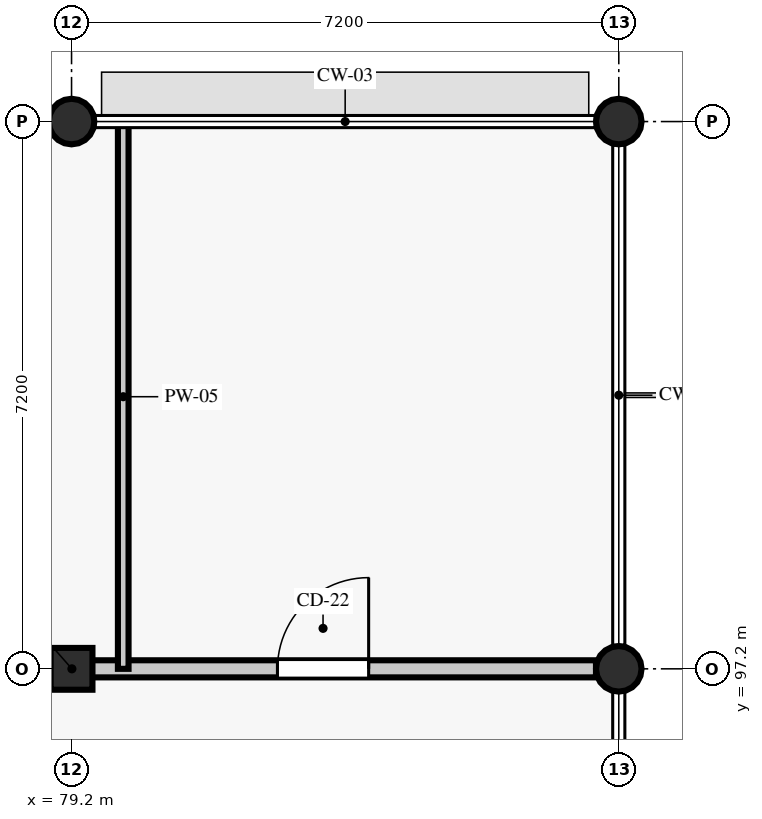
"""IFC4 building model, lengths in metres.
Left out: names, types, materials, properties, quantities, classifications, styles, units other than length and angle.
Written with IfcOpenShell. Run it as: python <this file> out.ifc"""

import sys

from ifc_helpers import new_model, si_unit, direction, frame, frame_2d, origin, origin_2d, place, context, subcontext, project, spatial, rectangle, circle, extrude, element, fill, save


model = new_model("IFC4")
c1 = context("Model", 3, precision=1e-05, world=origin(), true_north=direction((0.0, 1.0)))
c2 = subcontext(c1, "Body", "Model", "MODEL_VIEW")
j1 = project(units=[si_unit("LENGTHUNIT", "METRE"), si_unit("PLANEANGLEUNIT", "RADIAN")], contexts=[c1])
p1 = place(None, origin())
s1 = spatial("IfcSite", under=j1, at=p1, CompositionType="ELEMENT")
p2 = place(p1, origin())
s2 = spatial("IfcBuilding", under=s1, at=p2, CompositionType="ELEMENT")
p3 = place(p2, frame((0.0, 0.0, 18.0)))
s3 = spatial("IfcBuildingStorey", under=s2, at=p3, CompositionType="ELEMENT", Elevation=18.0)
p4 = place(p3, frame((79.2, 97.2, 0.0), z_axis=(0.0, 0.0, 1.0), x_axis=(1.0, 0.0, 0.0)))
e1 = element("IfcColumn", 1, at=p4, inside=s3, PredefinedType="COLUMN", context=c2, shape_type="SweptSolid", body=[
    extrude(rectangle(XDim=0.55, YDim=0.55, at=origin_2d()), origin(), (0.0, 0.0, 1.0), 3.94),
])
for number, where, z_axis, x_axis in (
    (2, (79.2, 104.4, 0.0), (0.0, 0.0, 1.0), (1.0, 0.0, 0.0)),
    (3, (86.4, 97.2, 0.0), (0.0, 0.0, 1.0), (1.0, 0.0, 0.0)),
    (4, (86.4, 104.4, 0.0), (0.0, 0.0, 1.0), (1.0, 0.0, 0.0)),
):
    element("IfcColumn", number, at=place(p3, frame(where, z_axis=z_axis, x_axis=x_axis)), inside=s3, PredefinedType="COLUMN", context=c2, shape_type="SweptSolid", body=[
        extrude(circle(Radius=0.3, at=origin_2d()), origin(), (0.0, 0.0, 1.0), 3.94),
    ])
p5 = place(p3, frame((57.9, 97.2, 0.0), z_axis=(0.0, 0.0, 1.0), x_axis=(1.0, 0.0, 0.0)))
e5 = element("IfcWall", 5, at=p5, inside=s3, PredefinedType="PARTITIONING", context=c2, shape_type="SweptSolid", body=[
    extrude(rectangle(XDim=28.2, YDim=0.225, at=frame_2d((14.1, 0.0))), origin(), (0.0, 0.0, 1.0), 3.19),
])
p6 = place(p5, frame((2.778, 0.0, 0.0)))
e6 = element("IfcOpeningElement", 6, at=p6, cuts=e5, PredefinedType="OPENING", context=c2, shape_type="SweptSolid", body=[
    extrude(rectangle(XDim=1.13, YDim=2.18, at=frame_2d((0.565, 1.09))), frame((0.0, 0.123, 0.0), z_axis=(0.0, -1.0, 0.0), x_axis=(1.0, 0.0, 0.0)), (0.0, 0.0, 1.0), 0.245),
])
p7 = place(p5, frame((7.89, 0.0, 0.0)))
e7 = element("IfcOpeningElement", 7, at=p7, cuts=e5, PredefinedType="OPENING", context=c2, shape_type="SweptSolid", body=[
    extrude(rectangle(XDim=0.9, YDim=2.13, at=frame_2d((0.45, 1.065))), frame((0.0, 0.123, 0.0), z_axis=(0.0, -1.0, 0.0), x_axis=(1.0, 0.0, 0.0)), (0.0, 0.0, 1.0), 0.245),
])
p8 = place(p5, frame((10.01, 0.0, 0.0)))
e8 = element("IfcOpeningElement", 8, at=p8, cuts=e5, PredefinedType="OPENING", context=c2, shape_type="SweptSolid", body=[
    extrude(rectangle(XDim=0.92, YDim=2.18, at=frame_2d((0.46, 1.09))), frame((0.0, 0.123, 0.0), z_axis=(0.0, -1.0, 0.0), x_axis=(1.0, 0.0, 0.0)), (0.0, 0.0, 1.0), 0.245),
])
p9 = place(p5, frame((12.19, 0.0, 0.0)))
e9 = element("IfcOpeningElement", 9, at=p9, cuts=e5, PredefinedType="OPENING", context=c2, shape_type="SweptSolid", body=[
    extrude(rectangle(XDim=0.94, YDim=2.08, at=frame_2d((0.47, 1.04))), frame((0.0, 0.123, 0.0), z_axis=(0.0, -1.0, 0.0), x_axis=(1.0, 0.0, 0.0)), (0.0, 0.0, 1.0), 0.245),
])
p10 = place(p5, frame((17.48, 0.0, 0.0)))
e10 = element("IfcOpeningElement", 10, at=p10, cuts=e5, PredefinedType="OPENING", context=c2, shape_type="SweptSolid", body=[
    extrude(rectangle(XDim=1.12, YDim=2.23, at=frame_2d((0.56, 1.115))), frame((0.0, 0.123, 0.0), z_axis=(0.0, -1.0, 0.0), x_axis=(1.0, 0.0, 0.0)), (0.0, 0.0, 1.0), 0.245),
])
p11 = place(p5, frame((24.009, 0.0, 0.0)))
e11 = element("IfcOpeningElement", 11, at=p11, cuts=e5, PredefinedType="OPENING", context=c2, shape_type="SweptSolid", body=[
    extrude(rectangle(XDim=1.2, YDim=2.23, at=frame_2d((0.6, 1.115))), frame((0.0, 0.123, 0.0), z_axis=(0.0, -1.0, 0.0), x_axis=(1.0, 0.0, 0.0)), (0.0, 0.0, 1.0), 0.245),
])
p12 = place(p3, frame((79.88, 97.2, 0.0), z_axis=(0.0, 0.0, 1.0), x_axis=(0.0, 1.0, 0.0)))
e12 = element("IfcWall", 12, at=p12, inside=s3, PredefinedType="PARTITIONING", context=c2, shape_type="SweptSolid", body=[
    extrude(rectangle(XDim=7.16, YDim=0.14, at=frame_2d((3.58, 0.0))), origin(), (0.0, 0.0, 1.0), 3.19),
])
p13 = place(p11, origin())
e13 = element("IfcDoor", 13, at=p13, inside=s3, OperationType="SINGLE_SWING_RIGHT", PredefinedType="DOOR", context=c2, shape_type="SweptSolid", body=[
    extrude(rectangle(XDim=1.2, YDim=2.23, at=frame_2d((0.6, 1.115))), frame((0.0, 0.025, 0.0), z_axis=(0.0, -1.0, 0.0), x_axis=(1.0, 0.0, 0.0)), (0.0, 0.0, 1.0), 0.05),
])
fill(e11, e13)
save(model, sys.argv[1])
